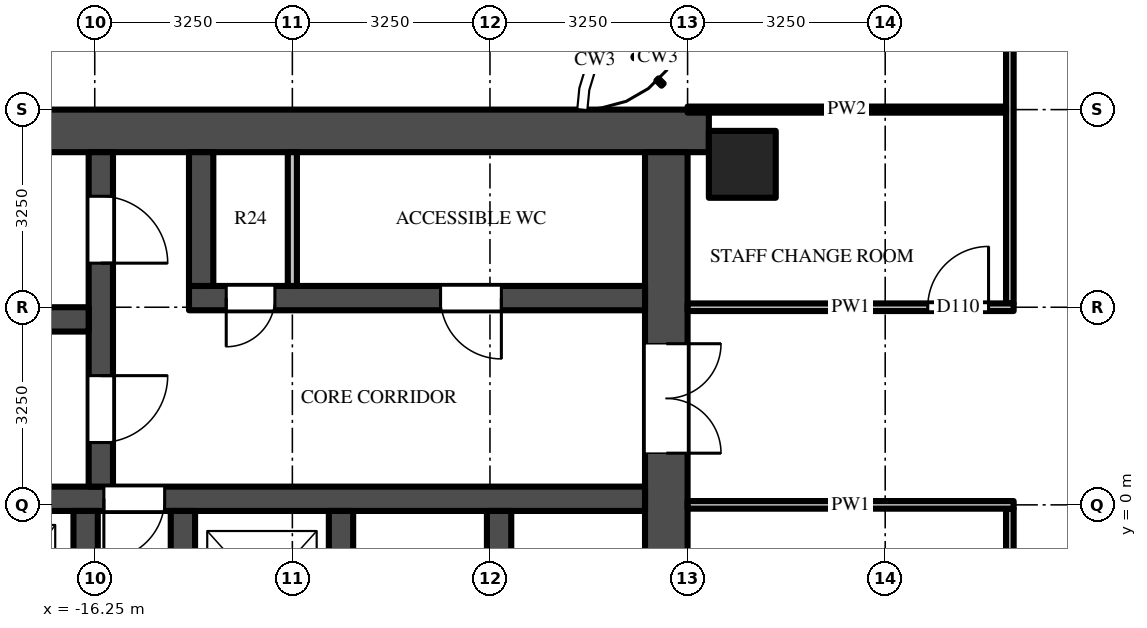
"""IFC4 building model, lengths in metres.
Left out: names, types, materials, properties, quantities, classifications, styles, units other than length and angle.
Written with IfcOpenShell. Run it as: python <this file> out.ifc"""

import sys

from ifc_helpers import new_model, si_unit, direction, frame, frame_2d, origin, origin_2d, place, context, subcontext, project, spatial, rectangle, extrude, source, transform, mapped, element, fill, save


model = new_model("IFC4")
c1 = context("Model", 3, precision=1e-05, world=origin(), true_north=direction((0.0, 1.0)))
c2 = subcontext(c1, "Body", "Model", "MODEL_VIEW")
j1 = project(units=[si_unit("LENGTHUNIT", "METRE"), si_unit("PLANEANGLEUNIT", "RADIAN")], contexts=[c1])
p1 = place(None, origin())
s1 = spatial("IfcSite", under=j1, at=p1, CompositionType="ELEMENT")
p2 = place(p1, origin())
s2 = spatial("IfcBuilding", under=s1, at=p2, CompositionType="ELEMENT")
p3 = place(p2, frame((0.0, 0.0, 224.6)))
s3 = spatial("IfcBuildingStorey", under=s2, at=p3, CompositionType="ELEMENT", Elevation=224.6)
m1 = source(origin(), c2, "Body", "SweptSolid", [
    extrude(rectangle(XDim=1.1, YDim=1.1, at=origin_2d()), origin(), (0.0, 0.0, 1.0), 3.9),
])
p4 = place(p3, frame((-5.6, 5.6, 0.0), z_axis=(0.0, 0.0, 1.0), x_axis=(1.0, 0.0, 0.0)))
e1 = element("IfcColumn", 1, at=p4, inside=s3, PredefinedType="COLUMN", context=c2, shape_type="MappedRepresentation", body=[
    mapped(m1, transform((0.0, 0.0, 0.0))),
])
m2 = source(origin(), c2, "Body", "SweptSolid", [
    extrude(rectangle(XDim=16.6, YDim=0.7, at=frame_2d((8.3, 0.0))), origin(), (0.0, 0.0, 1.0), 3.7),
])
p5 = place(p3, frame((-6.15, 6.15, 0.0), z_axis=(0.0, 0.0, 1.0), x_axis=(-1.0, 0.0, 0.0)))
e2 = element("IfcWall", 2, at=p5, inside=s3, PredefinedType="SHEAR", context=c2, shape_type="MappedRepresentation", body=[
    mapped(m2, transform((0.0, 0.0, 0.0))),
])
m3 = source(origin(), c2, "Body", "SweptSolid", [
    extrude(rectangle(XDim=9.05, YDim=0.7, at=frame_2d((4.525, 0.0))), origin(), (0.0, 0.0, 1.0), 3.7),
])
p6 = place(p3, frame((-6.85, 5.8, 0.0), z_axis=(0.0, 0.0, 1.0), x_axis=(0.0, -1.0, 0.0)))
e3 = element("IfcWall", 3, at=p6, inside=s3, PredefinedType="SHEAR", context=c2, shape_type="MappedRepresentation", body=[
    mapped(m3, transform((0.0, 0.0, 0.0))),
])
m4 = source(origin(), c2, "Body", "SweptSolid", [
    extrude(rectangle(XDim=1.8, YDim=2.1, at=frame_2d((0.9, 1.05))), frame((0.0, 0.36, 0.0), z_axis=(0.0, -1.0, 0.0), x_axis=(1.0, 0.0, 0.0)), (0.0, 0.0, 1.0), 0.72),
])
p7 = place(p6, frame((3.15, 0.0, 0.0)))
e4 = element("IfcOpeningElement", 4, at=p7, cuts=e3, PredefinedType="OPENING", context=c2, shape_type="MappedRepresentation", body=[
    mapped(m4, transform((0.0, 0.0, 0.0))),
])
m5 = source(origin(), c2, "Body", "SweptSolid", [
    extrude(rectangle(XDim=7.5, YDim=0.4, at=frame_2d((3.75, 0.0))), origin(), (0.0, 0.0, 1.0), 3.7),
])
p8 = place(p3, frame((-7.2, 3.4, 0.0), z_axis=(0.0, 0.0, 1.0), x_axis=(-1.0, 0.0, 0.0)))
e5 = element("IfcWall", 5, at=p8, inside=s3, PredefinedType="SHEAR", context=c2, shape_type="MappedRepresentation", body=[
    mapped(m5, transform((0.0, 0.0, 0.0))),
])
m6 = source(origin(), c2, "Body", "SweptSolid", [
    extrude(rectangle(XDim=1.0, YDim=2.1, at=frame_2d((0.5, 1.05))), frame((0.0, 0.21, 0.0), z_axis=(0.0, -1.0, 0.0), x_axis=(1.0, 0.0, 0.0)), (0.0, 0.0, 1.0), 0.42),
])
p9 = place(p8, frame((2.363, 0.0, 0.0)))
e6 = element("IfcOpeningElement", 6, at=p9, cuts=e5, PredefinedType="OPENING", context=c2, shape_type="MappedRepresentation", body=[
    mapped(m6, transform((0.0, 0.0, 0.0))),
])
m7 = source(origin(), c2, "Body", "SweptSolid", [
    extrude(rectangle(XDim=0.8, YDim=2.1, at=frame_2d((0.4, 1.05))), frame((0.0, 0.21, 0.0), z_axis=(0.0, -1.0, 0.0), x_axis=(1.0, 0.0, 0.0)), (0.0, 0.0, 1.0), 0.42),
])
p10 = place(p8, frame((6.087, 0.0, 0.0)))
e7 = element("IfcOpeningElement", 7, at=p10, cuts=e5, PredefinedType="OPENING", context=c2, shape_type="MappedRepresentation", body=[
    mapped(m7, transform((0.0, 0.0, 0.0))),
])
m8 = source(origin(), c2, "Body", "SweptSolid", [
    extrude(rectangle(XDim=14.85, YDim=0.4, at=frame_2d((7.425, 0.0))), origin(), (0.0, 0.0, 1.0), 3.7),
])
p11 = place(p3, frame((-7.2, 0.1, 0.0), z_axis=(0.0, 0.0, 1.0), x_axis=(-1.0, 0.0, 0.0)))
e8 = element("IfcWall", 8, at=p11, inside=s3, PredefinedType="SHEAR", context=c2, shape_type="MappedRepresentation", body=[
    mapped(m8, transform((0.0, 0.0, 0.0))),
])
p12 = place(p11, frame((7.9, 0.0, 0.0)))
e9 = element("IfcOpeningElement", 9, at=p12, cuts=e8, PredefinedType="OPENING", context=c2, shape_type="MappedRepresentation", body=[
    mapped(m6, transform((0.0, 0.0, 0.0))),
])
m9 = source(origin(), c2, "Body", "SweptSolid", [
    extrude(rectangle(XDim=5.5, YDim=0.4, at=frame_2d((2.75, 0.0))), origin(), (0.0, 0.0, 1.0), 3.7),
])
p13 = place(p3, frame((-16.15, 5.8, 0.0), z_axis=(0.0, 0.0, 1.0), x_axis=(0.0, -1.0, 0.0)))
e10 = element("IfcWall", 10, at=p13, inside=s3, PredefinedType="SHEAR", context=c2, shape_type="MappedRepresentation", body=[
    mapped(m9, transform((0.0, 0.0, 0.0))),
])
m10 = source(origin(), c2, "Body", "SweptSolid", [
    extrude(rectangle(XDim=1.1, YDim=2.1, at=frame_2d((0.55, 1.05))), frame((0.0, 0.21, 0.0), z_axis=(0.0, -1.0, 0.0), x_axis=(1.0, 0.0, 0.0)), (0.0, 0.0, 1.0), 0.42),
])
p14 = place(p13, frame((0.725, 0.0, 0.0)))
e11 = element("IfcOpeningElement", 11, at=p14, cuts=e10, PredefinedType="OPENING", context=c2, shape_type="MappedRepresentation", body=[
    mapped(m10, transform((0.0, 0.0, 0.0))),
])
p15 = place(p13, frame((3.675, 0.0, 0.0)))
e12 = element("IfcOpeningElement", 12, at=p15, cuts=e10, PredefinedType="OPENING", context=c2, shape_type="MappedRepresentation", body=[
    mapped(m10, transform((0.0, 0.0, 0.0))),
])
m11 = source(origin(), c2, "Body", "SweptSolid", [
    extrude(rectangle(XDim=5.7, YDim=0.4, at=frame_2d((2.85, 0.0))), origin(), (0.0, 0.0, 1.0), 3.7),
])
p16 = place(p3, frame((-16.35, 3.05, 0.0), z_axis=(0.0, 0.0, 1.0), x_axis=(-1.0, 0.0, 0.0)))
e13 = element("IfcWall", 13, at=p16, inside=s3, PredefinedType="SHEAR", context=c2, shape_type="MappedRepresentation", body=[
    mapped(m11, transform((0.0, 0.0, 0.0))),
])
m12 = source(origin(), c2, "Body", "SweptSolid", [
    extrude(rectangle(XDim=2.2, YDim=0.4, at=frame_2d((1.1, 0.0))), origin(), (0.0, 0.0, 1.0), 3.7),
])
p17 = place(p3, frame((-14.5, 5.8, 0.0), z_axis=(0.0, 0.0, 1.0), x_axis=(0.0, -1.0, 0.0)))
e14 = element("IfcWall", 14, at=p17, inside=s3, PredefinedType="SHEAR", context=c2, shape_type="MappedRepresentation", body=[
    mapped(m12, transform((0.0, 0.0, 0.0))),
])
m13 = source(origin(), c2, "Body", "SweptSolid", [
    extrude(rectangle(XDim=2.45, YDim=0.4, at=frame_2d((1.225, 0.0))), origin(), (0.0, 0.0, 1.0), 3.7),
])
for number, where, z_axis, x_axis in (
    (15, (-9.6, -0.1, 0.0), (0.0, 0.0, 1.0), (0.0, -1.0, 0.0)),
    (16, (-12.2, -0.1, 0.0), (0.0, 0.0, 1.0), (0.0, -1.0, 0.0)),
    (17, (-14.8, -0.1, 0.0), (0.0, 0.0, 1.0), (0.0, -1.0, 0.0)),
    (18, (-16.4, -0.1, 0.0), (0.0, 0.0, 1.0), (0.0, -1.0, 0.0)),
):
    element("IfcWall", number, at=place(p3, frame(where, z_axis=z_axis, x_axis=x_axis)), inside=s3, PredefinedType="SHEAR", context=c2, shape_type="MappedRepresentation", body=[
        mapped(m13, transform((0.0, 0.0, 0.0))),
    ])
m14 = source(origin(), c2, "Body", "SweptSolid", [
    extrude(rectangle(XDim=2.2, YDim=0.15, at=frame_2d((1.1, 0.0))), origin(), (0.0, 0.0, 1.0), 3.7),
])
p18 = place(p3, frame((-13.0, 5.8, 0.0), z_axis=(0.0, 0.0, 1.0), x_axis=(0.0, -1.0, 0.0)))
e19 = element("IfcWall", 19, at=p18, inside=s3, PredefinedType="PARTITIONING", context=c2, shape_type="MappedRepresentation", body=[
    mapped(m14, transform((0.0, 0.0, 0.0))),
])
m15 = source(origin(), c2, "Body", "SweptSolid", [
    extrude(rectangle(XDim=3.125, YDim=0.125, at=frame_2d((1.562, 0.0))), origin(), (0.0, 0.0, 1.0), 3.068),
])
p19 = place(p3, frame((-1.2, -0.062, 0.0), z_axis=(0.0, 0.0, 1.0), x_axis=(0.0, -1.0, 0.0)))
e20 = element("IfcWall", 20, at=p19, inside=s3, PredefinedType="PARTITIONING", context=c2, shape_type="MappedRepresentation", body=[
    mapped(m15, transform((0.0, 0.0, 0.0))),
])
m16 = source(origin(), c2, "Body", "SweptSolid", [
    extrude(rectangle(XDim=8.725, YDim=0.125, at=frame_2d((4.363, 0.0))), origin(), (0.0, 0.0, 1.0), 2.997),
])
p20 = place(p3, frame((-1.2, 12.038, 0.0), z_axis=(0.0, 0.0, 1.0), x_axis=(0.0, -1.0, 0.0)))
e21 = element("IfcWall", 21, at=p20, inside=s3, PredefinedType="PARTITIONING", context=c2, shape_type="MappedRepresentation", body=[
    mapped(m16, transform((0.0, 0.0, 0.0))),
])
m17 = source(origin(), c2, "Body", "SweptSolid", [
    extrude(rectangle(XDim=5.363, YDim=0.125, at=frame_2d((2.681, 0.0))), origin(), (0.0, 0.0, 1.0), 2.997),
])
p21 = place(p3, frame((-1.137, 0.0, 0.0), z_axis=(0.0, 0.0, 1.0), x_axis=(-1.0, 0.0, 0.0)))
e22 = element("IfcWall", 22, at=p21, inside=s3, PredefinedType="PARTITIONING", context=c2, shape_type="MappedRepresentation", body=[
    mapped(m17, transform((0.0, 0.0, 0.0))),
])
p22 = place(p3, frame((-6.5, 3.25, 0.0), z_axis=(0.0, 0.0, 1.0), x_axis=(1.0, 0.0, 0.0)))
e23 = element("IfcWall", 23, at=p22, inside=s3, PredefinedType="PARTITIONING", context=c2, shape_type="MappedRepresentation", body=[
    mapped(m17, transform((0.0, 0.0, 0.0))),
])
m18 = source(origin(), c2, "Body", "SweptSolid", [
    extrude(rectangle(XDim=1.0, YDim=2.1, at=frame_2d((0.5, 1.05))), frame((0.0, 0.073, 0.0), z_axis=(0.0, -1.0, 0.0), x_axis=(1.0, 0.0, 0.0)), (0.0, 0.0, 1.0), 0.145),
])
p23 = place(p22, frame((3.95, 0.0, 0.0)))
e24 = element("IfcOpeningElement", 24, at=p23, cuts=e23, PredefinedType="OPENING", context=c2, shape_type="MappedRepresentation", body=[
    mapped(m18, transform((0.0, 0.0, 0.0))),
])
m19 = source(origin(), c2, "Body", "SweptSolid", [
    extrude(rectangle(XDim=5.238, YDim=0.1, at=frame_2d((2.619, 0.0))), origin(), (0.0, 0.0, 1.0), 2.78),
])
p24 = place(p3, frame((-6.5, 6.5, 0.0), z_axis=(0.0, 0.0, 1.0), x_axis=(1.0, 0.0, 0.0)))
e25 = element("IfcWall", 25, at=p24, inside=s3, PredefinedType="PARTITIONING", context=c2, shape_type="MappedRepresentation", body=[
    mapped(m19, transform((0.0, 0.0, 0.0))),
])
m20 = source(origin(), c2, "Body", "SweptSolid", [
    extrude(rectangle(XDim=1.8, YDim=2.1, at=frame_2d((0.9, 1.05))), frame((0.0, -0.275, 0.0), z_axis=(0.0, -1.0, 0.0), x_axis=(1.0, 0.0, 0.0)), (0.0, 0.0, 1.0), 0.05),
])
p25 = place(p7, origin())
e26 = element("IfcDoor", 26, at=p25, inside=s3, OperationType="DOUBLE_DOOR_SINGLE_SWING", PredefinedType="DOOR", context=c2, shape_type="MappedRepresentation", body=[
    mapped(m20, transform((0.0, 0.0, 0.0))),
])
fill(e4, e26)
m21 = source(origin(), c2, "Body", "SweptSolid", [
    extrude(rectangle(XDim=1.1, YDim=2.1, at=frame_2d((0.55, 1.05))), frame((0.0, 0.025, 0.0), z_axis=(0.0, -1.0, 0.0), x_axis=(1.0, 0.0, 0.0)), (0.0, 0.0, 1.0), 0.05),
])
p26 = place(p14, origin())
e27 = element("IfcDoor", 27, at=p26, inside=s3, OperationType="SINGLE_SWING_RIGHT", PredefinedType="DOOR", context=c2, shape_type="MappedRepresentation", body=[
    mapped(m21, transform((0.0, 0.0, 0.0))),
])
fill(e11, e27)
p27 = place(p15, origin())
e28 = element("IfcDoor", 28, at=p27, inside=s3, OperationType="SINGLE_SWING_LEFT", PredefinedType="DOOR", context=c2, shape_type="MappedRepresentation", body=[
    mapped(m21, transform((0.0, 0.0, 0.0))),
])
fill(e12, e28)
m22 = source(origin(), c2, "Body", "SweptSolid", [
    extrude(rectangle(XDim=1.0, YDim=2.1, at=frame_2d((0.5, 1.05))), frame((0.0, 0.025, 0.0), z_axis=(0.0, -1.0, 0.0), x_axis=(1.0, 0.0, 0.0)), (0.0, 0.0, 1.0), 0.05),
])
p28 = place(p12, origin())
e29 = element("IfcDoor", 29, at=p28, inside=s3, OperationType="SINGLE_SWING_RIGHT", PredefinedType="DOOR", context=c2, shape_type="MappedRepresentation", body=[
    mapped(m22, transform((0.0, 0.0, 0.0))),
])
fill(e9, e29)
p29 = place(p9, origin())
e30 = element("IfcDoor", 30, at=p29, inside=s3, OperationType="SINGLE_SWING_LEFT", PredefinedType="DOOR", context=c2, shape_type="MappedRepresentation", body=[
    mapped(m22, transform((0.0, 0.0, 0.0))),
])
fill(e6, e30)
m23 = source(origin(), c2, "Body", "SweptSolid", [
    extrude(rectangle(XDim=0.8, YDim=2.1, at=frame_2d((0.4, 1.05))), frame((0.0, 0.025, 0.0), z_axis=(0.0, -1.0, 0.0), x_axis=(1.0, 0.0, 0.0)), (0.0, 0.0, 1.0), 0.05),
])
p30 = place(p10, origin())
e31 = element("IfcDoor", 31, at=p30, inside=s3, OperationType="SINGLE_SWING_RIGHT", PredefinedType="DOOR", context=c2, shape_type="MappedRepresentation", body=[
    mapped(m23, transform((0.0, 0.0, 0.0))),
])
fill(e7, e31)
p31 = place(p23, origin())
e32 = element("IfcDoor", 32, at=p31, inside=s3, OperationType="SINGLE_SWING_RIGHT", PredefinedType="DOOR", context=c2, shape_type="MappedRepresentation", body=[
    mapped(m22, transform((0.0, 0.0, 0.0))),
])
fill(e24, e32)
save(model, sys.argv[1])
